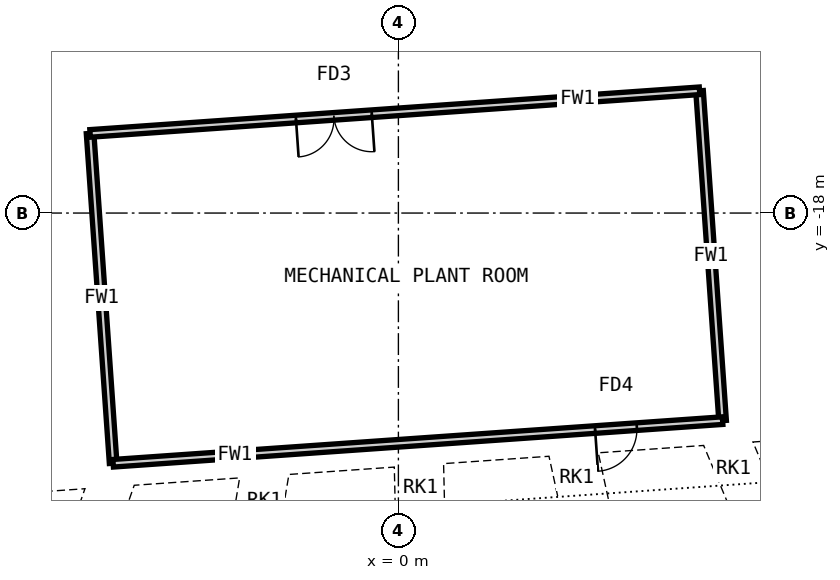
"""IFC4 building model, lengths in metres.
Left out: names, types, materials, properties, quantities, classifications, styles, units other than length and angle.
Written with IfcOpenShell. Run it as: python <this file> out.ifc"""

import sys

from ifc_helpers import new_model, si_unit, direction, frame, frame_2d, origin, origin_2d, place, context, subcontext, project, spatial, rectangle, hollow_rectangle, extrude, clip, halfspace, element, fill, save


model = new_model("IFC4")
c1 = context("Model", 3, precision=1e-05, world=origin(), true_north=direction((0.0, 1.0)))
c2 = subcontext(c1, "Body", "Model", "MODEL_VIEW")
j1 = project(units=[si_unit("LENGTHUNIT", "METRE"), si_unit("PLANEANGLEUNIT", "RADIAN")], contexts=[c1])
p1 = place(None, origin())
s1 = spatial("IfcSite", under=j1, at=p1, CompositionType="ELEMENT")
p2 = place(p1, origin())
s2 = spatial("IfcBuilding", under=s1, at=p2, CompositionType="ELEMENT")
p3 = place(p2, frame((0.0, 0.0, 97.0)))
s3 = spatial("IfcBuildingStorey", under=s2, at=p3, CompositionType="ELEMENT", Elevation=97.0)
p4 = place(p3, frame((9.417, -26.407, 0.0), z_axis=(-0.128235593091, 0.306214774523, 0.943285823348), x_axis=(-0.894720710854, -0.446025293529, 0.023157873405)))
e1 = element("IfcColumn", 1, at=p4, inside=s3, PredefinedType="COLUMN", context=c2, shape_type="Clipping", body=[
    clip(clip(extrude(hollow_rectangle(XDim=1.3, YDim=1.3, WallThickness=0.1, at=origin_2d()), origin(), (0.0, 0.0, 1.0), 6.361), halfspace(frame((0.0, 0.0, 0.229), z_axis=(0.0, 0.0, -1.0), x_axis=(0.0, -1.0, 0.0)), False)), halfspace(frame((0.0, 0.0, 6.132), z_axis=(0.0, 0.0, 1.0), x_axis=(0.0, 1.0, 0.0)), False)),
])
p5 = place(p3, frame((5.023, -26.715, 0.0), z_axis=(-0.068098876241, 0.311882056078, 0.947677226777), x_axis=(-0.960500011412, -0.277387540935, 0.022268367958)))
e2 = element("IfcColumn", 2, at=p5, inside=s3, PredefinedType="COLUMN", context=c2, shape_type="Clipping", body=[
    clip(clip(extrude(hollow_rectangle(XDim=1.3, YDim=1.3, WallThickness=0.1, at=origin_2d()), origin(), (0.0, 0.0, 1.0), 6.331), halfspace(frame((0.0, 0.0, 0.216), z_axis=(0.0, 0.0, -1.0), x_axis=(0.0, -1.0, 0.0)), False)), halfspace(frame((0.0, 0.0, 6.115), z_axis=(0.0, 0.0, 1.0), x_axis=(0.0, 1.0, 0.0)), False)),
])
p6 = place(p3, frame((0.629, -27.022, 0.0), z_axis=(-0.007372155698, 0.316462327576, 0.948576431578), x_axis=(-0.995752449125, -0.089383873868, 0.022081285159)))
e3 = element("IfcColumn", 3, at=p6, inside=s3, PredefinedType="COLUMN", context=c2, shape_type="Clipping", body=[
    clip(clip(extrude(hollow_rectangle(XDim=1.3, YDim=1.3, WallThickness=0.1, at=origin_2d()), origin(), (0.0, 0.0, 1.0), 6.325), halfspace(frame((0.0, 0.0, 0.215), z_axis=(0.0, 0.0, -1.0), x_axis=(0.0, -1.0, 0.0)), False)), halfspace(frame((0.0, 0.0, 6.111), z_axis=(0.0, 0.0, 1.0), x_axis=(0.0, 1.0, 0.0)), False)),
])
p7 = place(p3, frame((-3.765, -27.329, 0.0), z_axis=(0.053311800006, 0.319793815484, 0.945986134971), x_axis=(-0.99483572434, 0.098946545157, 0.022615542849)))
e4 = element("IfcColumn", 4, at=p7, inside=s3, PredefinedType="COLUMN", context=c2, shape_type="Clipping", body=[
    clip(clip(extrude(hollow_rectangle(XDim=1.3, YDim=1.3, WallThickness=0.1, at=origin_2d()), origin(), (0.0, 0.0, 1.0), 6.343), halfspace(frame((0.0, 0.0, 0.235), z_axis=(0.0, 0.0, -1.0), x_axis=(0.0, -1.0, 0.0)), False)), halfspace(frame((0.0, 0.0, 6.108), z_axis=(0.0, 0.0, 1.0), x_axis=(0.0, 1.0, 0.0)), False)),
])
p8 = place(p3, frame((-8.159, -27.636, 0.0), z_axis=(0.113209802682, 0.32199774621, 0.939947334702), x_axis=(-0.962840505356, 0.269019109131, 0.023809245446)))
e5 = element("IfcColumn", 5, at=p8, inside=s3, PredefinedType="COLUMN", context=c2, shape_type="Clipping", body=[
    clip(clip(extrude(hollow_rectangle(XDim=1.3, YDim=1.3, WallThickness=0.1, at=origin_2d()), origin(), (0.0, 0.0, 1.0), 6.383), halfspace(frame((0.0, 0.0, 0.246), z_axis=(0.0, 0.0, -1.0), x_axis=(0.0, -1.0, 0.0)), False)), halfspace(frame((0.0, 0.0, 6.137), z_axis=(0.0, 0.0, 1.0), x_axis=(0.0, 1.0, 0.0)), False)),
])
p9 = place(p3, frame((8.531, -23.462, 0.0), z_axis=(0.0, 0.0, 1.0), x_axis=(-0.069761270222, 0.997563714846, 0.0)))
e6 = element("IfcWall", 6, at=p9, inside=s3, PredefinedType="PARTITIONING", context=c2, shape_type="SweptSolid", body=[
    extrude(rectangle(XDim=8.7, YDim=0.2, at=frame_2d((4.35, 0.0))), origin(), (0.0, 0.0, 1.0), 5.83),
])
p10 = place(p3, frame((-7.506, -24.583, 0.0), z_axis=(0.0, 0.0, 1.0), x_axis=(-0.069763223123, 0.997563578274, 0.0)))
e7 = element("IfcWall", 7, at=p10, inside=s3, PredefinedType="PARTITIONING", context=c2, shape_type="SweptSolid", body=[
    extrude(rectangle(XDim=8.7, YDim=0.2, at=frame_2d((4.35, 0.0))), origin(), (0.0, 0.0, 1.0), 5.83),
])
p11 = place(p3, frame((7.924, -14.783, 0.0), z_axis=(0.0, 0.0, 1.0), x_axis=(-0.997563365873, -0.069766260243, 0.0)))
e8 = element("IfcWall", 8, at=p11, inside=s3, PredefinedType="PARTITIONING", context=c2, shape_type="SweptSolid", body=[
    extrude(rectangle(XDim=16.076, YDim=0.2, at=frame_2d((8.038, 0.0))), origin(), (0.0, 0.0, 1.0), 5.83),
])
p12 = place(p11, frame((8.646, 0.0, 0.0)))
e9 = element("IfcOpeningElement", 9, at=p12, cuts=e8, PredefinedType="OPENING", context=c2, shape_type="SweptSolid", body=[
    extrude(rectangle(XDim=2.0, YDim=2.4, at=frame_2d((1.0, 1.2))), frame((0.0, 0.11, 0.0), z_axis=(0.0, -1.0, 0.0), x_axis=(1.0, 0.0, 0.0)), (0.0, 0.0, 1.0), 0.22),
])
p13 = place(p3, frame((8.531, -23.462, 0.0), z_axis=(0.0, 0.0, 1.0), x_axis=(-0.997564422675, -0.069751147749, 0.0)))
e10 = element("IfcWall", 10, at=p13, inside=s3, PredefinedType="PARTITIONING", context=c2, shape_type="SweptSolid", body=[
    extrude(rectangle(XDim=16.076, YDim=0.2, at=frame_2d((8.038, 0.0))), origin(), (0.0, 0.0, 1.0), 5.83),
])
p14 = place(p13, frame((2.263, 0.0, 0.0)))
e11 = element("IfcOpeningElement", 11, at=p14, cuts=e10, PredefinedType="OPENING", context=c2, shape_type="SweptSolid", body=[
    extrude(rectangle(XDim=1.1, YDim=2.1, at=frame_2d((0.55, 1.05))), frame((0.0, 0.11, 0.0), z_axis=(0.0, -1.0, 0.0), x_axis=(1.0, 0.0, 0.0)), (0.0, 0.0, 1.0), 0.22),
])
p15 = place(p12, origin())
e12 = element("IfcDoor", 12, at=p15, inside=s3, OperationType="DOUBLE_DOOR_DOUBLE_SWING", PredefinedType="DOOR", context=c2, shape_type="SweptSolid", body=[
    extrude(rectangle(XDim=2.0, YDim=2.4, at=frame_2d((1.0, 1.2))), frame((0.0, 0.025, 0.0), z_axis=(0.0, -1.0, 0.0), x_axis=(1.0, 0.0, 0.0)), (0.0, 0.0, 1.0), 0.05),
])
fill(e9, e12)
p16 = place(p14, origin())
e13 = element("IfcDoor", 13, at=p16, inside=s3, OperationType="SINGLE_SWING_LEFT", PredefinedType="DOOR", context=c2, shape_type="SweptSolid", body=[
    extrude(rectangle(XDim=1.1, YDim=2.1, at=frame_2d((0.55, 1.05))), frame((0.0, 0.025, 0.0), z_axis=(0.0, -1.0, 0.0), x_axis=(1.0, 0.0, 0.0)), (0.0, 0.0, 1.0), 0.05),
])
fill(e11, e13)
save(model, sys.argv[1])
